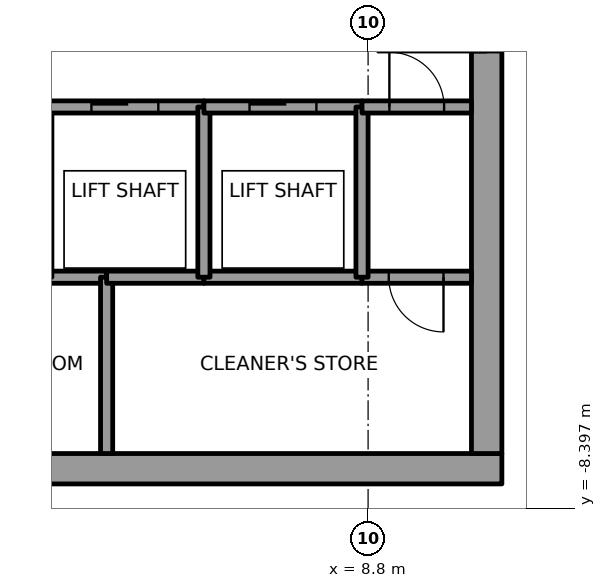
"""IFC4 building model, lengths in metres.
Left out: names, types, materials, properties, quantities, classifications, styles, units other than length and angle.
Written with IfcOpenShell. Run it as: python <this file> out.ifc"""

import sys

from ifc_helpers import new_model, si_unit, direction, frame, frame_2d, origin, place, context, subcontext, project, spatial, rectangle, extrude, element, fill, save


model = new_model("IFC4")
c1 = context("Model", 3, precision=1e-05, world=origin(), true_north=direction((0.0, 1.0)))
c2 = subcontext(c1, "Body", "Model", "MODEL_VIEW")
j1 = project(units=[si_unit("LENGTHUNIT", "METRE"), si_unit("PLANEANGLEUNIT", "RADIAN")], contexts=[c1])
p1 = place(None, origin())
s1 = spatial("IfcSite", under=j1, at=p1, CompositionType="ELEMENT")
p2 = place(p1, origin())
s2 = spatial("IfcBuilding", under=s1, at=p2, CompositionType="ELEMENT")
p3 = place(p2, frame((0.0, 0.0, 311.0)))
s3 = spatial("IfcBuildingStorey", under=s2, at=p3, CompositionType="ELEMENT", Elevation=311.0)
p4 = place(p3, frame((-11.0, -7.75, 0.0), z_axis=(0.0, 0.0, 1.0), x_axis=(1.0, 0.0, 0.0)))
e1 = element("IfcWall", 1, at=p4, inside=s3, PredefinedType="SHEAR", context=c2, shape_type="SweptSolid", body=[
    extrude(rectangle(XDim=22.0, YDim=0.5, at=frame_2d((11.0, 0.0))), origin(), (0.0, 0.0, 1.0), 4.0),
])
p5 = place(p4, frame((10.45, 0.0, 0.0)))
e2 = element("IfcOpeningElement", 2, at=p5, cuts=e1, PredefinedType="OPENING", context=c2, shape_type="SweptSolid", body=[
    extrude(rectangle(XDim=1.1, YDim=2.1, at=frame_2d((0.55, 1.05))), frame((0.0, 0.25, 0.0), z_axis=(0.0, -1.0, 0.0), x_axis=(1.0, 0.0, 0.0)), (0.0, 0.0, 1.0), 0.5),
])
p6 = place(p3, frame((10.75, -7.5, 0.0), z_axis=(0.0, 0.0, 1.0), x_axis=(0.0, 1.0, 0.0)))
e3 = element("IfcWall", 3, at=p6, inside=s3, PredefinedType="SHEAR", context=c2, shape_type="SweptSolid", body=[
    extrude(rectangle(XDim=15.0, YDim=0.5, at=frame_2d((7.5, 0.0))), origin(), (0.0, 0.0, 1.0), 4.0),
])
p7 = place(p6, frame((6.6, 0.0, 0.0)))
e4 = element("IfcOpeningElement", 4, at=p7, cuts=e3, PredefinedType="OPENING", context=c2, shape_type="SweptSolid", body=[
    extrude(rectangle(XDim=1.8, YDim=2.1, at=frame_2d((0.9, 1.05))), frame((0.0, 0.25, 0.0), z_axis=(0.0, -1.0, 0.0), x_axis=(1.0, 0.0, 0.0)), (0.0, 0.0, 1.0), 0.5),
])
p8 = place(p3, frame((4.5, -4.6, 0.0), z_axis=(0.0, 0.0, 1.0), x_axis=(-1.0, 0.0, 0.0)))
e5 = element("IfcWall", 5, at=p8, inside=s3, PredefinedType="SOLIDWALL", context=c2, shape_type="SweptSolid", body=[
    extrude(rectangle(XDim=1.0, YDim=0.2, at=frame_2d((0.5, 0.0))), origin(), (0.0, 0.0, 1.0), 3.85),
])
p9 = place(p3, frame((3.5, -1.8, 0.0), z_axis=(0.0, 0.0, 1.0), x_axis=(1.0, 0.0, 0.0)))
e6 = element("IfcWall", 6, at=p9, inside=s3, PredefinedType="SOLIDWALL", context=c2, shape_type="SweptSolid", body=[
    extrude(rectangle(XDim=2.6, YDim=0.2, at=frame_2d((1.3, 0.0))), origin(), (0.0, 0.0, 1.0), 3.85),
])
p10 = place(p9, frame((0.75, 0.0, 0.0)))
e7 = element("IfcOpeningElement", 7, at=p10, cuts=e6, PredefinedType="OPENING", context=c2, shape_type="SweptSolid", body=[
    extrude(rectangle(XDim=1.1, YDim=2.1, at=frame_2d((0.55, 1.05))), frame((0.0, 0.1, 0.0), z_axis=(0.0, -1.0, 0.0), x_axis=(1.0, 0.0, 0.0)), (0.0, 0.0, 1.0), 0.2),
])
p11 = place(p3, frame((4.5, -4.6, 0.0), z_axis=(0.0, 0.0, 1.0), x_axis=(0.0, -1.0, 0.0)))
e8 = element("IfcWall", 8, at=p11, inside=s3, PredefinedType="SOLIDWALL", context=c2, shape_type="SweptSolid", body=[
    extrude(rectangle(XDim=2.9, YDim=0.2, at=frame_2d((1.45, 0.0))), origin(), (0.0, 0.0, 1.0), 3.85),
])
p12 = place(p3, frame((6.1, -4.6, 0.0), z_axis=(0.0, 0.0, 1.0), x_axis=(-1.0, 0.0, 0.0)))
e9 = element("IfcWall", 9, at=p12, inside=s3, PredefinedType="SOLIDWALL", context=c2, shape_type="SweptSolid", body=[
    extrude(rectangle(XDim=1.6, YDim=0.2, at=frame_2d((0.8, 0.0))), origin(), (0.0, 0.0, 1.0), 3.85),
])
p13 = place(p3, frame((8.7, -4.6, 0.0), z_axis=(0.0, 0.0, 1.0), x_axis=(-1.0, 0.0, 0.0)))
e10 = element("IfcWall", 10, at=p13, inside=s3, PredefinedType="SOLIDWALL", context=c2, shape_type="SweptSolid", body=[
    extrude(rectangle(XDim=2.6, YDim=0.2, at=frame_2d((1.3, 0.0))), origin(), (0.0, 0.0, 1.0), 3.85),
])
p14 = place(p3, frame((6.1, -4.6, 0.0), z_axis=(0.0, 0.0, 1.0), x_axis=(0.0, 1.0, 0.0)))
e11 = element("IfcWall", 11, at=p14, inside=s3, PredefinedType="SOLIDWALL", context=c2, shape_type="SweptSolid", body=[
    extrude(rectangle(XDim=2.8, YDim=0.2, at=frame_2d((1.4, 0.0))), origin(), (0.0, 0.0, 1.0), 3.85),
])
p15 = place(p3, frame((6.1, -1.8, 0.0), z_axis=(0.0, 0.0, 1.0), x_axis=(1.0, 0.0, 0.0)))
e12 = element("IfcWall", 12, at=p15, inside=s3, PredefinedType="SOLIDWALL", context=c2, shape_type="SweptSolid", body=[
    extrude(rectangle(XDim=2.6, YDim=0.2, at=frame_2d((1.3, 0.0))), origin(), (0.0, 0.0, 1.0), 3.85),
])
p16 = place(p15, frame((0.75, 0.0, 0.0)))
e13 = element("IfcOpeningElement", 13, at=p16, cuts=e12, PredefinedType="OPENING", context=c2, shape_type="SweptSolid", body=[
    extrude(rectangle(XDim=1.1, YDim=2.1, at=frame_2d((0.55, 1.05))), frame((0.0, 0.1, 0.0), z_axis=(0.0, -1.0, 0.0), x_axis=(1.0, 0.0, 0.0)), (0.0, 0.0, 1.0), 0.2),
])
p17 = place(p3, frame((10.5, -4.6, 0.0), z_axis=(0.0, 0.0, 1.0), x_axis=(-1.0, 0.0, 0.0)))
e14 = element("IfcWall", 14, at=p17, inside=s3, PredefinedType="SOLIDWALL", context=c2, shape_type="SweptSolid", body=[
    extrude(rectangle(XDim=1.8, YDim=0.2, at=frame_2d((0.9, 0.0))), origin(), (0.0, 0.0, 1.0), 3.85),
])
p18 = place(p17, frame((0.46, 0.0, 0.0)))
e15 = element("IfcOpeningElement", 15, at=p18, cuts=e14, PredefinedType="OPENING", context=c2, shape_type="SweptSolid", body=[
    extrude(rectangle(XDim=0.9, YDim=2.1, at=frame_2d((0.45, 1.05))), frame((0.0, 0.1, 0.0), z_axis=(0.0, -1.0, 0.0), x_axis=(1.0, 0.0, 0.0)), (0.0, 0.0, 1.0), 0.2),
])
p19 = place(p3, frame((8.7, -1.8, 0.0), z_axis=(0.0, 0.0, 1.0), x_axis=(0.0, -1.0, 0.0)))
e16 = element("IfcWall", 16, at=p19, inside=s3, PredefinedType="SOLIDWALL", context=c2, shape_type="SweptSolid", body=[
    extrude(rectangle(XDim=2.8, YDim=0.2, at=frame_2d((1.4, 0.0))), origin(), (0.0, 0.0, 1.0), 3.85),
])
p20 = place(p3, frame((8.7, -1.8, 0.0), z_axis=(0.0, 0.0, 1.0), x_axis=(1.0, 0.0, 0.0)))
e17 = element("IfcWall", 17, at=p20, inside=s3, PredefinedType="SOLIDWALL", context=c2, shape_type="SweptSolid", body=[
    extrude(rectangle(XDim=1.8, YDim=0.2, at=frame_2d((0.9, 0.0))), origin(), (0.0, 0.0, 1.0), 3.85),
])
p21 = place(p20, frame((0.45, 0.0, 0.0)))
e18 = element("IfcOpeningElement", 18, at=p21, cuts=e17, PredefinedType="OPENING", context=c2, shape_type="SweptSolid", body=[
    extrude(rectangle(XDim=0.9, YDim=2.1, at=frame_2d((0.45, 1.05))), frame((0.0, 0.1, 0.0), z_axis=(0.0, -1.0, 0.0), x_axis=(1.0, 0.0, 0.0)), (0.0, 0.0, 1.0), 0.2),
])
p22 = place(p10, origin())
e19 = element("IfcDoor", 19, at=p22, inside=s3, OperationType="SLIDING_TO_LEFT", PredefinedType="DOOR", context=c2, shape_type="SweptSolid", body=[
    extrude(rectangle(XDim=1.1, YDim=2.1, at=frame_2d((0.55, 1.05))), frame((0.0, 0.025, 0.0), z_axis=(0.0, -1.0, 0.0), x_axis=(1.0, 0.0, 0.0)), (0.0, 0.0, 1.0), 0.05),
])
fill(e7, e19)
p23 = place(p16, origin())
e20 = element("IfcDoor", 20, at=p23, inside=s3, OperationType="SLIDING_TO_LEFT", PredefinedType="DOOR", context=c2, shape_type="SweptSolid", body=[
    extrude(rectangle(XDim=1.1, YDim=2.1, at=frame_2d((0.55, 1.05))), frame((0.0, 0.025, 0.0), z_axis=(0.0, -1.0, 0.0), x_axis=(1.0, 0.0, 0.0)), (0.0, 0.0, 1.0), 0.05),
])
fill(e13, e20)
p24 = place(p18, origin())
e21 = element("IfcDoor", 21, at=p24, inside=s3, OperationType="SINGLE_SWING_LEFT", PredefinedType="DOOR", context=c2, shape_type="SweptSolid", body=[
    extrude(rectangle(XDim=0.9, YDim=2.1, at=frame_2d((0.45, 1.05))), frame((0.0, 0.025, 0.0), z_axis=(0.0, -1.0, 0.0), x_axis=(1.0, 0.0, 0.0)), (0.0, 0.0, 1.0), 0.05),
])
fill(e15, e21)
p25 = place(p21, origin())
e22 = element("IfcDoor", 22, at=p25, inside=s3, OperationType="SINGLE_SWING_RIGHT", PredefinedType="DOOR", context=c2, shape_type="SweptSolid", body=[
    extrude(rectangle(XDim=0.9, YDim=2.1, at=frame_2d((0.45, 1.05))), frame((0.0, 0.025, 0.0), z_axis=(0.0, -1.0, 0.0), x_axis=(1.0, 0.0, 0.0)), (0.0, 0.0, 1.0), 0.05),
])
fill(e18, e22)
p26 = place(p7, origin())
e23 = element("IfcDoor", 23, at=p26, inside=s3, OperationType="DOUBLE_DOOR_SINGLE_SWING", PredefinedType="DOOR", context=c2, shape_type="SweptSolid", body=[
    extrude(rectangle(XDim=1.8, YDim=2.1, at=frame_2d((0.9, 1.05))), frame((0.0, 0.025, 0.0), z_axis=(0.0, -1.0, 0.0), x_axis=(1.0, 0.0, 0.0)), (0.0, 0.0, 1.0), 0.05),
])
fill(e4, e23)
save(model, sys.argv[1])
